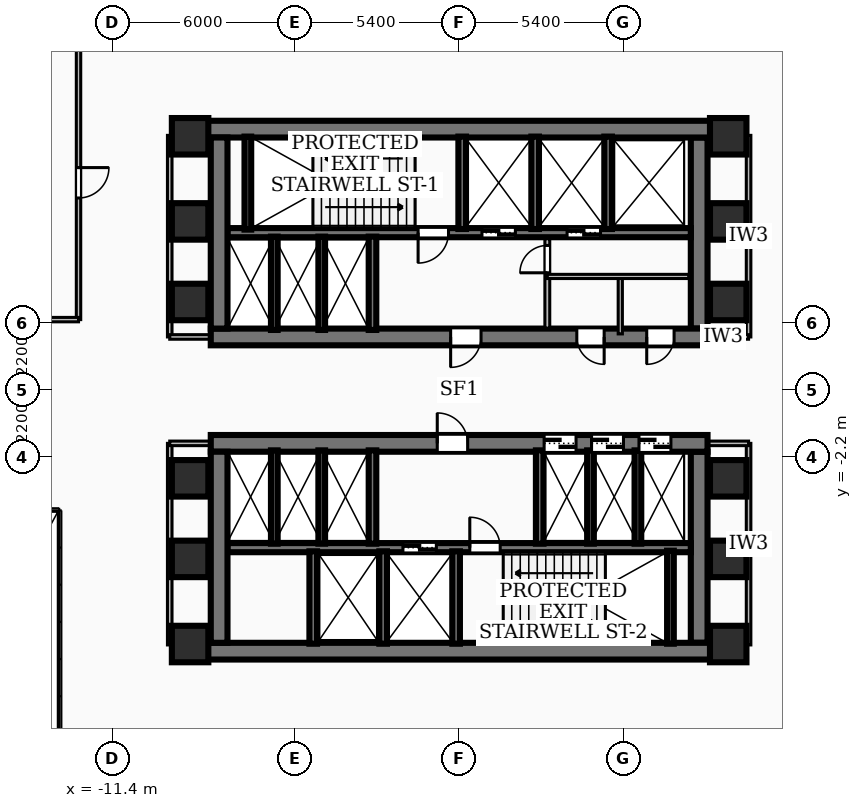
"""IFC4 building model, lengths in metres.
Left out: names, types, materials, properties, quantities, classifications, styles, units other than length and angle.
Written with IfcOpenShell. Run it as: python <this file> out.ifc"""

import sys

from ifc_helpers import new_model, si_unit, direction, frame, frame_2d, origin, origin_2d, place, context, subcontext, project, spatial, rectangle, extrude, element, fill, save


model = new_model("IFC4")
c1 = context("Model", 3, precision=1e-05, world=origin(), true_north=direction((0.0, 1.0)))
c2 = subcontext(c1, "Body", "Model", "MODEL_VIEW")
j1 = project(units=[si_unit("LENGTHUNIT", "METRE"), si_unit("PLANEANGLEUNIT", "RADIAN")], contexts=[c1])
p1 = place(None, origin())
s1 = spatial("IfcSite", under=j1, at=p1, CompositionType="ELEMENT")
p2 = place(p1, origin())
s2 = spatial("IfcBuilding", under=s1, at=p2, CompositionType="ELEMENT")
p3 = place(p2, frame((0.0, 0.0, 5.4)))
s3 = spatial("IfcBuildingStorey", under=s2, at=p3, CompositionType="ELEMENT", Elevation=5.4)
p4 = place(p3, frame((-8.78, 8.585, 0.0), z_axis=(0.0, 0.0, 1.0), x_axis=(1.0, 0.0, 0.0)))
e1 = element("IfcWall", 1, at=p4, inside=s3, PredefinedType="SHEAR", context=c2, shape_type="SweptSolid", body=[
    extrude(rectangle(XDim=17.56, YDim=0.55, at=frame_2d((8.78, 0.0))), origin(), (0.0, 0.0, 1.0), 4.36),
])
p5 = place(p3, frame((8.17, 1.75, 0.0), z_axis=(0.0, 0.0, 1.0), x_axis=(-1.0, 0.0, 0.0)))
e2 = element("IfcWall", 2, at=p5, inside=s3, PredefinedType="SHEAR", context=c2, shape_type="SweptSolid", body=[
    extrude(rectangle(XDim=16.34, YDim=0.55, at=frame_2d((8.17, 0.0))), origin(), (0.0, 0.0, 1.0), 4.36),
])
p6 = place(p5, frame((7.45, 0.0, 0.0)))
e3 = element("IfcOpeningElement", 3, at=p6, cuts=e2, PredefinedType="OPENING", context=c2, shape_type="SweptSolid", body=[
    extrude(rectangle(XDim=1.0, YDim=2.1, at=frame_2d((0.5, 1.05))), frame((0.0, 0.285, 0.0), z_axis=(0.0, -1.0, 0.0), x_axis=(1.0, 0.0, 0.0)), (0.0, 0.0, 1.0), 0.57),
])
p7 = place(p5, frame((3.4, 0.0, 0.0)))
e4 = element("IfcOpeningElement", 4, at=p7, cuts=e2, PredefinedType="OPENING", context=c2, shape_type="SweptSolid", body=[
    extrude(rectangle(XDim=0.9, YDim=2.06, at=frame_2d((0.45, 1.03))), frame((0.0, 0.285, 0.0), z_axis=(0.0, -1.0, 0.0), x_axis=(1.0, 0.0, 0.0)), (0.0, 0.0, 1.0), 0.57),
])
p8 = place(p5, frame((1.1, 0.0, 0.0)))
e5 = element("IfcOpeningElement", 5, at=p8, cuts=e2, PredefinedType="OPENING", context=c2, shape_type="SweptSolid", body=[
    extrude(rectangle(XDim=0.9, YDim=2.06, at=frame_2d((0.45, 1.03))), frame((0.0, 0.285, 0.0), z_axis=(0.0, -1.0, 0.0), x_axis=(1.0, 0.0, 0.0)), (0.0, 0.0, 1.0), 0.57),
])
for number, where, z_axis, x_axis in (
    (6, (-7.895, 2.025, 0.0), (0.0, 0.0, 1.0), (0.0, 1.0, 0.0)),
    (7, (7.895, 8.31, 0.0), (0.0, 0.0, 1.0), (0.0, -1.0, 0.0)),
):
    element("IfcWall", number, at=place(p3, frame(where, z_axis=z_axis, x_axis=x_axis)), inside=s3, PredefinedType="SHEAR", context=c2, shape_type="SweptSolid", body=[
        extrude(rectangle(XDim=6.285, YDim=0.55, at=frame_2d((3.143, 0.0))), origin(), (0.0, 0.0, 1.0), 4.36),
    ])
p9 = place(p3, frame((7.62, 5.18, 0.0), z_axis=(0.0, 0.0, 1.0), x_axis=(-1.0, 0.0, 0.0)))
e8 = element("IfcWall", 8, at=p9, inside=s3, PredefinedType="SOLIDWALL", context=c2, shape_type="SweptSolid", body=[
    extrude(rectangle(XDim=15.24, YDim=0.3, at=frame_2d((7.62, 0.0))), origin(), (0.0, 0.0, 1.0), 4.36),
])
p10 = place(p9, frame((5.77, 0.0, 0.0)))
e9 = element("IfcOpeningElement", 9, at=p10, cuts=e8, PredefinedType="OPENING", context=c2, shape_type="SweptSolid", body=[
    extrude(rectangle(XDim=1.1, YDim=2.15, at=frame_2d((0.55, 1.075))), frame((0.0, 0.16, 0.0), z_axis=(0.0, -1.0, 0.0), x_axis=(1.0, 0.0, 0.0)), (0.0, 0.0, 1.0), 0.32),
])
p11 = place(p9, frame((2.97, 0.0, 0.0)))
e10 = element("IfcOpeningElement", 10, at=p11, cuts=e8, PredefinedType="OPENING", context=c2, shape_type="SweptSolid", body=[
    extrude(rectangle(XDim=1.1, YDim=2.15, at=frame_2d((0.55, 1.075))), frame((0.0, 0.16, 0.0), z_axis=(0.0, -1.0, 0.0), x_axis=(1.0, 0.0, 0.0)), (0.0, 0.0, 1.0), 0.32),
])
p12 = place(p9, frame((7.97, 0.0, 0.0)))
e11 = element("IfcOpeningElement", 11, at=p12, cuts=e8, PredefinedType="OPENING", context=c2, shape_type="SweptSolid", body=[
    extrude(rectangle(XDim=1.0, YDim=2.1, at=frame_2d((0.5, 1.05))), frame((0.0, 0.16, 0.0), z_axis=(0.0, -1.0, 0.0), x_axis=(1.0, 0.0, 0.0)), (0.0, 0.0, 1.0), 0.32),
])
p13 = place(p3, frame((8.78, -8.585, 0.0), z_axis=(0.0, 0.0, 1.0), x_axis=(-1.0, 0.0, 0.0)))
e12 = element("IfcWall", 12, at=p13, inside=s3, PredefinedType="SHEAR", context=c2, shape_type="SweptSolid", body=[
    extrude(rectangle(XDim=17.56, YDim=0.55, at=frame_2d((8.78, 0.0))), origin(), (0.0, 0.0, 1.0), 4.36),
])
p14 = place(p3, frame((-8.17, -1.75, 0.0), z_axis=(0.0, 0.0, 1.0), x_axis=(1.0, 0.0, 0.0)))
e13 = element("IfcWall", 13, at=p14, inside=s3, PredefinedType="SHEAR", context=c2, shape_type="SweptSolid", body=[
    extrude(rectangle(XDim=16.34, YDim=0.55, at=frame_2d((8.17, 0.0))), origin(), (0.0, 0.0, 1.0), 4.36),
])
p15 = place(p14, frame((7.45, 0.0, 0.0)))
e14 = element("IfcOpeningElement", 14, at=p15, cuts=e13, PredefinedType="OPENING", context=c2, shape_type="SweptSolid", body=[
    extrude(rectangle(XDim=1.0, YDim=2.1, at=frame_2d((0.5, 1.05))), frame((0.0, 0.285, 0.0), z_axis=(0.0, -1.0, 0.0), x_axis=(1.0, 0.0, 0.0)), (0.0, 0.0, 1.0), 0.57),
])
p16 = place(p14, frame((10.965, 0.0, 0.0)))
e15 = element("IfcOpeningElement", 15, at=p16, cuts=e13, PredefinedType="OPENING", context=c2, shape_type="SweptSolid", body=[
    extrude(rectangle(XDim=1.05, YDim=2.15, at=frame_2d((0.525, 1.075))), frame((0.0, 0.285, 0.0), z_axis=(0.0, -1.0, 0.0), x_axis=(1.0, 0.0, 0.0)), (0.0, 0.0, 1.0), 0.57),
])
p17 = place(p14, frame((12.525, 0.0, 0.0)))
e16 = element("IfcOpeningElement", 16, at=p17, cuts=e13, PredefinedType="OPENING", context=c2, shape_type="SweptSolid", body=[
    extrude(rectangle(XDim=1.05, YDim=2.15, at=frame_2d((0.525, 1.075))), frame((0.0, 0.285, 0.0), z_axis=(0.0, -1.0, 0.0), x_axis=(1.0, 0.0, 0.0)), (0.0, 0.0, 1.0), 0.57),
])
p18 = place(p14, frame((14.085, 0.0, 0.0)))
e17 = element("IfcOpeningElement", 17, at=p18, cuts=e13, PredefinedType="OPENING", context=c2, shape_type="SweptSolid", body=[
    extrude(rectangle(XDim=1.05, YDim=2.15, at=frame_2d((0.525, 1.075))), frame((0.0, 0.285, 0.0), z_axis=(0.0, -1.0, 0.0), x_axis=(1.0, 0.0, 0.0)), (0.0, 0.0, 1.0), 0.57),
])
for number, where, z_axis, x_axis in (
    (18, (-7.895, -8.31, 0.0), (0.0, 0.0, 1.0), (0.0, 1.0, 0.0)),
    (19, (7.895, -2.025, 0.0), (0.0, 0.0, 1.0), (0.0, -1.0, 0.0)),
):
    element("IfcWall", number, at=place(p3, frame(where, z_axis=z_axis, x_axis=x_axis)), inside=s3, PredefinedType="SHEAR", context=c2, shape_type="SweptSolid", body=[
        extrude(rectangle(XDim=6.285, YDim=0.55, at=frame_2d((3.143, 0.0))), origin(), (0.0, 0.0, 1.0), 4.36),
    ])
p19 = place(p3, frame((-7.62, -5.18, 0.0), z_axis=(0.0, 0.0, 1.0), x_axis=(1.0, 0.0, 0.0)))
e20 = element("IfcWall", 20, at=p19, inside=s3, PredefinedType="SOLIDWALL", context=c2, shape_type="SweptSolid", body=[
    extrude(rectangle(XDim=15.24, YDim=0.3, at=frame_2d((7.62, 0.0))), origin(), (0.0, 0.0, 1.0), 4.36),
])
p20 = place(p19, frame((5.77, 0.0, 0.0)))
e21 = element("IfcOpeningElement", 21, at=p20, cuts=e20, PredefinedType="OPENING", context=c2, shape_type="SweptSolid", body=[
    extrude(rectangle(XDim=1.1, YDim=2.15, at=frame_2d((0.55, 1.075))), frame((0.0, 0.16, 0.0), z_axis=(0.0, -1.0, 0.0), x_axis=(1.0, 0.0, 0.0)), (0.0, 0.0, 1.0), 0.32),
])
p21 = place(p19, frame((7.97, 0.0, 0.0)))
e22 = element("IfcOpeningElement", 22, at=p21, cuts=e20, PredefinedType="OPENING", context=c2, shape_type="SweptSolid", body=[
    extrude(rectangle(XDim=1.0, YDim=2.1, at=frame_2d((0.5, 1.05))), frame((0.0, 0.16, 0.0), z_axis=(0.0, -1.0, 0.0), x_axis=(1.0, 0.0, 0.0)), (0.0, 0.0, 1.0), 0.32),
])
for number, where, z_axis, x_axis in (
    (23, (-6.95, 5.28, 0.0), (0.0, 0.0, 1.0), (0.0, 1.0, 0.0)),
    (24, (6.95, -8.34, 0.0), (0.0, 0.0, 1.0), (0.0, 1.0, 0.0)),
):
    element("IfcWall", number, at=place(p3, frame(where, z_axis=z_axis, x_axis=x_axis)), inside=s3, PredefinedType="SOLIDWALL", context=c2, shape_type="SweptSolid", body=[
        extrude(rectangle(XDim=3.06, YDim=0.22, at=frame_2d((1.53, 0.0))), origin(), (0.0, 0.0, 1.0), 4.36),
    ])
for number, where, z_axis, x_axis in (
    (25, (0.1, 5.3, 0.0), (0.0, 0.0, 1.0), (0.0, 1.0, 0.0)),
    (26, (2.5, 5.3, 0.0), (0.0, 0.0, 1.0), (0.0, 1.0, 0.0)),
    (27, (4.9, 5.3, 0.0), (0.0, 0.0, 1.0), (0.0, 1.0, 0.0)),
):
    element("IfcWall", number, at=place(p3, frame(where, z_axis=z_axis, x_axis=x_axis)), inside=s3, PredefinedType="SOLIDWALL", context=c2, shape_type="SweptSolid", body=[
        extrude(rectangle(XDim=3.04, YDim=0.25, at=frame_2d((1.52, 0.0))), origin(), (0.0, 0.0, 1.0), 4.36),
    ])
p22 = place(p3, frame((-2.85, 1.98, 0.0), z_axis=(0.0, 0.0, 1.0), x_axis=(0.0, 1.0, 0.0)))
e28 = element("IfcWall", 28, at=p22, inside=s3, PredefinedType="SOLIDWALL", context=c2, shape_type="SweptSolid", body=[
    extrude(rectangle(XDim=3.07, YDim=0.25, at=frame_2d((1.535, 0.0))), origin(), (0.0, 0.0, 1.0), 4.36),
])
for number, where, z_axis, x_axis in (
    (29, (-0.1, -8.34, 0.0), (0.0, 0.0, 1.0), (0.0, 1.0, 0.0)),
    (30, (-2.5, -8.34, 0.0), (0.0, 0.0, 1.0), (0.0, 1.0, 0.0)),
    (31, (-4.8, -8.34, 0.0), (0.0, 0.0, 1.0), (0.0, 1.0, 0.0)),
):
    element("IfcWall", number, at=place(p3, frame(where, z_axis=z_axis, x_axis=x_axis)), inside=s3, PredefinedType="SOLIDWALL", context=c2, shape_type="SweptSolid", body=[
        extrude(rectangle(XDim=3.04, YDim=0.25, at=frame_2d((1.52, 0.0))), origin(), (0.0, 0.0, 1.0), 4.36),
    ])
for number, where, z_axis, x_axis in (
    (32, (-2.85, -5.05, 0.0), (0.0, 0.0, 1.0), (0.0, 1.0, 0.0)),
    (33, (2.65, -5.05, 0.0), (0.0, 0.0, 1.0), (0.0, 1.0, 0.0)),
):
    element("IfcWall", number, at=place(p3, frame(where, z_axis=z_axis, x_axis=x_axis)), inside=s3, PredefinedType="SOLIDWALL", context=c2, shape_type="SweptSolid", body=[
        extrude(rectangle(XDim=3.07, YDim=0.25, at=frame_2d((1.535, 0.0))), origin(), (0.0, 0.0, 1.0), 4.36),
    ])
for number, where, z_axis, x_axis in (
    (34, (-6.08, 1.98, 0.0), (0.0, 0.0, 1.0), (0.0, 1.0, 0.0)),
    (35, (-4.52, 1.98, 0.0), (0.0, 0.0, 1.0), (0.0, 1.0, 0.0)),
    (36, (4.32, -5.05, 0.0), (0.0, 0.0, 1.0), (0.0, 1.0, 0.0)),
    (37, (5.88, -5.05, 0.0), (0.0, 0.0, 1.0), (0.0, 1.0, 0.0)),
    (38, (-6.08, -5.05, 0.0), (0.0, 0.0, 1.0), (0.0, 1.0, 0.0)),
    (39, (-4.52, -5.05, 0.0), (0.0, 0.0, 1.0), (0.0, 1.0, 0.0)),
):
    element("IfcWall", number, at=place(p3, frame(where, z_axis=z_axis, x_axis=x_axis)), inside=s3, PredefinedType="SOLIDWALL", context=c2, shape_type="SweptSolid", body=[
        extrude(rectangle(XDim=3.07, YDim=0.22, at=frame_2d((1.535, 0.0))), origin(), (0.0, 0.0, 1.0), 4.36),
    ])
for number, where, z_axis, x_axis in (
    (40, (-8.85, -5.55, 0.0), (0.0, 0.0, 1.0), (1.0, 0.0, 0.0)),
    (41, (-8.85, -2.9, 0.0), (0.0, 0.0, 1.0), (1.0, 0.0, 0.0)),
    (42, (-8.85, 2.9, 0.0), (0.0, 0.0, 1.0), (1.0, 0.0, 0.0)),
    (43, (-8.85, 5.55, 0.0), (0.0, 0.0, 1.0), (1.0, 0.0, 0.0)),
    (44, (8.85, -5.55, 0.0), (0.0, 0.0, 1.0), (1.0, 0.0, 0.0)),
    (45, (8.85, -2.9, 0.0), (0.0, 0.0, 1.0), (1.0, 0.0, 0.0)),
    (46, (8.85, 2.9, 0.0), (0.0, 0.0, 1.0), (1.0, 0.0, 0.0)),
    (47, (8.85, 5.55, 0.0), (0.0, 0.0, 1.0), (1.0, 0.0, 0.0)),
    (48, (-8.85, 8.35, 0.0), (0.0, 0.0, 1.0), (1.0, 0.0, 0.0)),
    (49, (8.85, -8.35, 0.0), (0.0, 0.0, 1.0), (1.0, 0.0, 0.0)),
    (50, (8.85, 8.35, 0.0), (0.0, 0.0, 1.0), (1.0, 0.0, 0.0)),
    (51, (-8.85, -8.35, 0.0), (0.0, 0.0, 1.0), (1.0, 0.0, 0.0)),
):
    element("IfcColumn", number, at=place(p3, frame(where, z_axis=z_axis, x_axis=x_axis)), inside=s3, PredefinedType="COLUMN", context=c2, shape_type="SweptSolid", body=[
        extrude(rectangle(XDim=1.2, YDim=1.2, at=origin_2d()), origin(), (0.0, 0.0, 1.0), 4.68),
    ])
p23 = place(p3, frame((2.9, 2.04, 0.0), z_axis=(0.0, 0.0, 1.0), x_axis=(0.0, 1.0, 0.0)))
e52 = element("IfcWall", 52, at=p23, inside=s3, PredefinedType="PARTITIONING", context=c2, shape_type="SweptSolid", body=[
    extrude(rectangle(XDim=2.94, YDim=0.16, at=frame_2d((1.47, 0.0))), origin(), (0.0, 0.0, 1.0), 3.425),
])
p24 = place(p23, frame((1.82, 0.0, 0.0)))
e53 = element("IfcOpeningElement", 53, at=p24, cuts=e52, PredefinedType="OPENING", context=c2, shape_type="SweptSolid", body=[
    extrude(rectangle(XDim=0.9, YDim=2.06, at=frame_2d((0.45, 1.03))), frame((0.0, 0.09, 0.0), z_axis=(0.0, -1.0, 0.0), x_axis=(1.0, 0.0, 0.0)), (0.0, 0.0, 1.0), 0.18),
])
p25 = place(p3, frame((2.9, 3.74, 0.0), z_axis=(0.0, 0.0, 1.0), x_axis=(1.0, 0.0, 0.0)))
e54 = element("IfcWall", 54, at=p25, inside=s3, PredefinedType="PARTITIONING", context=c2, shape_type="SweptSolid", body=[
    extrude(rectangle(XDim=4.65, YDim=0.138, at=frame_2d((2.325, 0.0))), origin(), (0.0, 0.0, 1.0), 4.36),
])
p26 = place(p3, frame((5.3, 1.85, 0.0), z_axis=(0.0, 0.0, 1.0), x_axis=(0.0, 1.0, 0.0)))
e55 = element("IfcWall", 55, at=p26, inside=s3, PredefinedType="PARTITIONING", context=c2, shape_type="SweptSolid", body=[
    extrude(rectangle(XDim=1.89, YDim=0.138, at=frame_2d((0.945, 0.0))), origin(), (0.0, 0.0, 1.0), 3.425),
])
p27 = place(p3, frame((-9.52, 1.75, 0.0), z_axis=(0.0, 0.0, 1.0), x_axis=(0.0, 1.0, 0.0)))
e56 = element("IfcWall", 56, at=p27, inside=s3, PredefinedType="PARTITIONING", context=c2, shape_type="SweptSolid", body=[
    extrude(rectangle(XDim=6.63, YDim=0.15, at=frame_2d((3.315, 0.0))), origin(), (0.0, 0.0, 1.0), 3.37),
])
p28 = place(p3, frame((-7.85, 1.75, 0.0), z_axis=(0.0, 0.0, 1.0), x_axis=(-1.0, 0.0, 0.0)))
e57 = element("IfcWall", 57, at=p28, inside=s3, PredefinedType="PARTITIONING", context=c2, shape_type="SweptSolid", body=[
    extrude(rectangle(XDim=1.67, YDim=0.15, at=frame_2d((0.835, 0.0))), origin(), (0.0, 0.0, 1.0), 3.425),
])
p29 = place(p3, frame((-9.52, -8.38, 0.0), z_axis=(0.0, 0.0, 1.0), x_axis=(0.0, 1.0, 0.0)))
e58 = element("IfcWall", 58, at=p29, inside=s3, PredefinedType="PARTITIONING", context=c2, shape_type="SweptSolid", body=[
    extrude(rectangle(XDim=6.63, YDim=0.15, at=frame_2d((3.315, 0.0))), origin(), (0.0, 0.0, 1.0), 3.37),
])
p30 = place(p3, frame((-7.85, -1.75, 0.0), z_axis=(0.0, 0.0, 1.0), x_axis=(-1.0, 0.0, 0.0)))
e59 = element("IfcWall", 59, at=p30, inside=s3, PredefinedType="PARTITIONING", context=c2, shape_type="SweptSolid", body=[
    extrude(rectangle(XDim=1.67, YDim=0.15, at=frame_2d((0.835, 0.0))), origin(), (0.0, 0.0, 1.0), 3.425),
])
p31 = place(p3, frame((9.52, 1.75, 0.0), z_axis=(0.0, 0.0, 1.0), x_axis=(0.0, 1.0, 0.0)))
e60 = element("IfcWall", 60, at=p31, inside=s3, PredefinedType="PARTITIONING", context=c2, shape_type="SweptSolid", body=[
    extrude(rectangle(XDim=6.63, YDim=0.15, at=frame_2d((3.315, 0.0))), origin(), (0.0, 0.0, 1.0), 3.37),
])
p32 = place(p3, frame((7.85, 1.75, 0.0), z_axis=(0.0, 0.0, 1.0), x_axis=(1.0, 0.0, 0.0)))
e61 = element("IfcWall", 61, at=p32, inside=s3, PredefinedType="PARTITIONING", context=c2, shape_type="SweptSolid", body=[
    extrude(rectangle(XDim=1.67, YDim=0.15, at=frame_2d((0.835, 0.0))), origin(), (0.0, 0.0, 1.0), 3.425),
])
p33 = place(p3, frame((9.52, -8.38, 0.0), z_axis=(0.0, 0.0, 1.0), x_axis=(0.0, 1.0, 0.0)))
e62 = element("IfcWall", 62, at=p33, inside=s3, PredefinedType="PARTITIONING", context=c2, shape_type="SweptSolid", body=[
    extrude(rectangle(XDim=6.63, YDim=0.15, at=frame_2d((3.315, 0.0))), origin(), (0.0, 0.0, 1.0), 3.37),
])
p34 = place(p3, frame((7.85, -1.75, 0.0), z_axis=(0.0, 0.0, 1.0), x_axis=(1.0, 0.0, 0.0)))
e63 = element("IfcWall", 63, at=p34, inside=s3, PredefinedType="PARTITIONING", context=c2, shape_type="SweptSolid", body=[
    extrude(rectangle(XDim=1.67, YDim=0.15, at=frame_2d((0.835, 0.0))), origin(), (0.0, 0.0, 1.0), 3.425),
])
p35 = place(p3, frame((-12.52, 11.48, 0.0), z_axis=(0.0, 0.0, 1.0), x_axis=(0.0, -1.0, 0.0)))
e64 = element("IfcWall", 64, at=p35, inside=s3, PredefinedType="PARTITIONING", context=c2, shape_type="SweptSolid", body=[
    extrude(rectangle(XDim=9.16, YDim=0.145, at=frame_2d((4.58, 0.0))), origin(), (0.0, 0.0, 1.0), 3.37),
])
p36 = place(p35, frame((4.16, 0.0, 0.0)))
e65 = element("IfcOpeningElement", 65, at=p36, cuts=e64, PredefinedType="OPENING", context=c2, shape_type="SweptSolid", body=[
    extrude(rectangle(XDim=1.0, YDim=2.1, at=frame_2d((0.5, 1.05))), frame((0.0, 0.083, 0.0), z_axis=(0.0, -1.0, 0.0), x_axis=(1.0, 0.0, 0.0)), (0.0, 0.0, 1.0), 0.165),
])
p37 = place(p3, frame((-22.6, 2.32, 0.0), z_axis=(0.0, 0.0, 1.0), x_axis=(1.0, 0.0, 0.0)))
e66 = element("IfcWall", 66, at=p37, inside=s3, PredefinedType="PARTITIONING", context=c2, shape_type="SweptSolid", body=[
    extrude(rectangle(XDim=10.08, YDim=0.145, at=frame_2d((5.04, 0.0))), origin(), (0.0, 0.0, 1.0), 4.36),
])
p38 = place(p6, origin())
e67 = element("IfcDoor", 67, at=p38, inside=s3, OperationType="SINGLE_SWING_RIGHT", PredefinedType="DOOR", context=c2, shape_type="SweptSolid", body=[
    extrude(rectangle(XDim=1.0, YDim=2.1, at=frame_2d((0.5, 1.05))), frame((0.0, 0.025, 0.0), z_axis=(0.0, -1.0, 0.0), x_axis=(1.0, 0.0, 0.0)), (0.0, 0.0, 1.0), 0.05),
])
fill(e3, e67)
p39 = place(p15, origin())
e68 = element("IfcDoor", 68, at=p39, inside=s3, OperationType="SINGLE_SWING_LEFT", PredefinedType="DOOR", context=c2, shape_type="SweptSolid", body=[
    extrude(rectangle(XDim=1.0, YDim=2.1, at=frame_2d((0.5, 1.05))), frame((0.0, 0.025, 0.0), z_axis=(0.0, -1.0, 0.0), x_axis=(1.0, 0.0, 0.0)), (0.0, 0.0, 1.0), 0.05),
])
fill(e14, e68)
p40 = place(p10, origin())
e69 = element("IfcDoor", 69, at=p40, inside=s3, OperationType="DOUBLE_DOOR_SLIDING", PredefinedType="DOOR", context=c2, shape_type="SweptSolid", body=[
    extrude(rectangle(XDim=1.1, YDim=2.15, at=frame_2d((0.55, 1.075))), frame((0.0, 0.025, 0.0), z_axis=(0.0, -1.0, 0.0), x_axis=(1.0, 0.0, 0.0)), (0.0, 0.0, 1.0), 0.05),
])
fill(e9, e69)
p41 = place(p11, origin())
e70 = element("IfcDoor", 70, at=p41, inside=s3, OperationType="DOUBLE_DOOR_SLIDING", PredefinedType="DOOR", context=c2, shape_type="SweptSolid", body=[
    extrude(rectangle(XDim=1.1, YDim=2.15, at=frame_2d((0.55, 1.075))), frame((0.0, 0.025, 0.0), z_axis=(0.0, -1.0, 0.0), x_axis=(1.0, 0.0, 0.0)), (0.0, 0.0, 1.0), 0.05),
])
fill(e10, e70)
p42 = place(p12, origin())
e71 = element("IfcDoor", 71, at=p42, inside=s3, OperationType="SINGLE_SWING_RIGHT", PredefinedType="DOOR", context=c2, shape_type="SweptSolid", body=[
    extrude(rectangle(XDim=1.0, YDim=2.1, at=frame_2d((0.5, 1.05))), frame((0.0, 0.025, 0.0), z_axis=(0.0, -1.0, 0.0), x_axis=(1.0, 0.0, 0.0)), (0.0, 0.0, 1.0), 0.05),
])
fill(e11, e71)
p43 = place(p20, origin())
e72 = element("IfcDoor", 72, at=p43, inside=s3, OperationType="DOUBLE_DOOR_SLIDING", PredefinedType="DOOR", context=c2, shape_type="SweptSolid", body=[
    extrude(rectangle(XDim=1.1, YDim=2.15, at=frame_2d((0.55, 1.075))), frame((0.0, 0.025, 0.0), z_axis=(0.0, -1.0, 0.0), x_axis=(1.0, 0.0, 0.0)), (0.0, 0.0, 1.0), 0.05),
])
fill(e21, e72)
p44 = place(p21, origin())
e73 = element("IfcDoor", 73, at=p44, inside=s3, OperationType="SINGLE_SWING_LEFT", PredefinedType="DOOR", context=c2, shape_type="SweptSolid", body=[
    extrude(rectangle(XDim=1.0, YDim=2.1, at=frame_2d((0.5, 1.05))), frame((0.0, 0.025, 0.0), z_axis=(0.0, -1.0, 0.0), x_axis=(1.0, 0.0, 0.0)), (0.0, 0.0, 1.0), 0.05),
])
fill(e22, e73)
p45 = place(p16, origin())
e74 = element("IfcDoor", 74, at=p45, inside=s3, OperationType="DOUBLE_DOOR_SLIDING", PredefinedType="DOOR", context=c2, shape_type="SweptSolid", body=[
    extrude(rectangle(XDim=1.05, YDim=2.15, at=frame_2d((0.525, 1.075))), frame((0.0, 0.025, 0.0), z_axis=(0.0, -1.0, 0.0), x_axis=(1.0, 0.0, 0.0)), (0.0, 0.0, 1.0), 0.05),
])
fill(e15, e74)
p46 = place(p17, origin())
e75 = element("IfcDoor", 75, at=p46, inside=s3, OperationType="DOUBLE_DOOR_SLIDING", PredefinedType="DOOR", context=c2, shape_type="SweptSolid", body=[
    extrude(rectangle(XDim=1.05, YDim=2.15, at=frame_2d((0.525, 1.075))), frame((0.0, 0.025, 0.0), z_axis=(0.0, -1.0, 0.0), x_axis=(1.0, 0.0, 0.0)), (0.0, 0.0, 1.0), 0.05),
])
fill(e16, e75)
p47 = place(p18, origin())
e76 = element("IfcDoor", 76, at=p47, inside=s3, OperationType="DOUBLE_DOOR_SLIDING", PredefinedType="DOOR", context=c2, shape_type="SweptSolid", body=[
    extrude(rectangle(XDim=1.05, YDim=2.15, at=frame_2d((0.525, 1.075))), frame((0.0, 0.025, 0.0), z_axis=(0.0, -1.0, 0.0), x_axis=(1.0, 0.0, 0.0)), (0.0, 0.0, 1.0), 0.05),
])
fill(e17, e76)
p48 = place(p7, origin())
e77 = element("IfcDoor", 77, at=p48, inside=s3, OperationType="SINGLE_SWING_LEFT", PredefinedType="DOOR", context=c2, shape_type="SweptSolid", body=[
    extrude(rectangle(XDim=0.9, YDim=2.06, at=frame_2d((0.45, 1.03))), frame((0.0, 0.025, 0.0), z_axis=(0.0, -1.0, 0.0), x_axis=(1.0, 0.0, 0.0)), (0.0, 0.0, 1.0), 0.05),
])
fill(e4, e77)
p49 = place(p8, origin())
e78 = element("IfcDoor", 78, at=p49, inside=s3, OperationType="SINGLE_SWING_RIGHT", PredefinedType="DOOR", context=c2, shape_type="SweptSolid", body=[
    extrude(rectangle(XDim=0.9, YDim=2.06, at=frame_2d((0.45, 1.03))), frame((0.0, 0.025, 0.0), z_axis=(0.0, -1.0, 0.0), x_axis=(1.0, 0.0, 0.0)), (0.0, 0.0, 1.0), 0.05),
])
fill(e5, e78)
p50 = place(p24, origin())
e79 = element("IfcDoor", 79, at=p50, inside=s3, OperationType="SINGLE_SWING_LEFT", PredefinedType="DOOR", context=c2, shape_type="SweptSolid", body=[
    extrude(rectangle(XDim=0.9, YDim=2.06, at=frame_2d((0.45, 1.03))), frame((0.0, 0.025, 0.0), z_axis=(0.0, -1.0, 0.0), x_axis=(1.0, 0.0, 0.0)), (0.0, 0.0, 1.0), 0.05),
])
fill(e53, e79)
p51 = place(p36, origin())
e80 = element("IfcDoor", 80, at=p51, inside=s3, OperationType="SINGLE_SWING_LEFT", PredefinedType="DOOR", context=c2, shape_type="SweptSolid", body=[
    extrude(rectangle(XDim=1.0, YDim=2.1, at=frame_2d((0.5, 1.05))), frame((0.0, 0.025, 0.0), z_axis=(0.0, -1.0, 0.0), x_axis=(1.0, 0.0, 0.0)), (0.0, 0.0, 1.0), 0.05),
])
fill(e65, e80)
save(model, sys.argv[1])
